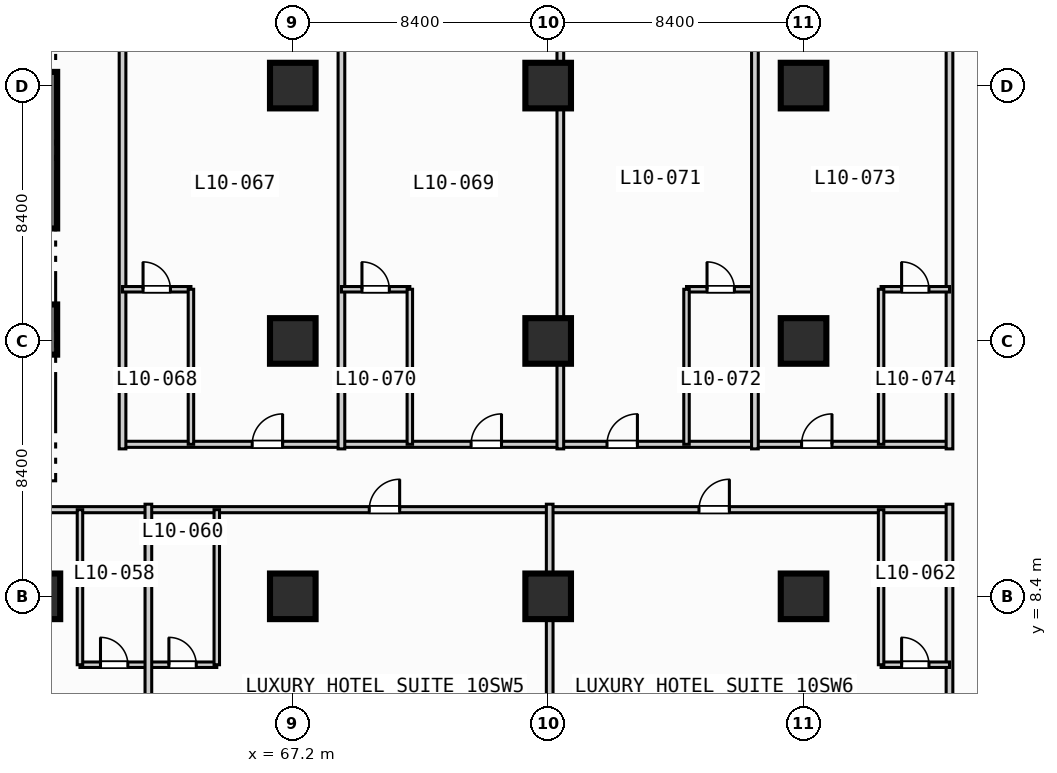
"""IFC4 building model, lengths in metres.
Left out: names, types, materials, properties, quantities, classifications, styles, units other than length and angle.
Written with IfcOpenShell. Run it as: python <this file> out.ifc"""

import sys

from ifc_helpers import new_model, si_unit, direction, frame, frame_2d, origin, origin_2d, place, context, subcontext, project, spatial, rectangle, extrude, element, fill, save


model = new_model("IFC4")
c1 = context("Model", 3, precision=1e-05, world=origin(), true_north=direction((0.0, 1.0)))
c2 = subcontext(c1, "Body", "Model", "MODEL_VIEW")
j1 = project(units=[si_unit("LENGTHUNIT", "METRE"), si_unit("PLANEANGLEUNIT", "RADIAN")], contexts=[c1])
p1 = place(None, origin())
s1 = spatial("IfcSite", under=j1, at=p1, CompositionType="ELEMENT")
p2 = place(p1, origin())
s2 = spatial("IfcBuilding", under=s1, at=p2, CompositionType="ELEMENT")
p3 = place(p2, frame((0.0, 0.0, 47.2)))
s3 = spatial("IfcBuildingStorey", under=s2, at=p3, CompositionType="ELEMENT", Elevation=47.2)
p4 = place(p3, frame((59.0, 16.35, 0.0), z_axis=(0.0, 0.0, 1.0), x_axis=(0.0, 1.0, 0.0)))
e1 = element("IfcWall", 1, at=p4, inside=s3, PredefinedType="SHEAR", context=c2, shape_type="SweptSolid", body=[
    extrude(rectangle(XDim=1.65, YDim=0.9, at=frame_2d((0.825, 0.0))), origin(), (0.0, 0.0, 1.0), 3.55),
])
p5 = place(p3, frame((59.0, 20.5, 0.0), z_axis=(0.0, 0.0, 1.0), x_axis=(0.0, 1.0, 0.0)))
e2 = element("IfcWall", 2, at=p5, inside=s3, PredefinedType="SHEAR", context=c2, shape_type="SweptSolid", body=[
    extrude(rectangle(XDim=5.15, YDim=0.9, at=frame_2d((2.575, 0.0))), origin(), (0.0, 0.0, 1.0), 3.55),
])
for number, where, z_axis, x_axis in (
    (3, (58.8, 8.4, 0.0), (0.0, 0.0, 1.0), (1.0, 0.0, 0.0)),
    (4, (67.2, 8.4, 0.0), (0.0, 0.0, 1.0), (1.0, 0.0, 0.0)),
    (5, (67.2, 16.8, 0.0), (0.0, 0.0, 1.0), (1.0, 0.0, 0.0)),
    (6, (67.2, 25.2, 0.0), (0.0, 0.0, 1.0), (1.0, 0.0, 0.0)),
    (7, (75.6, 8.4, 0.0), (0.0, 0.0, 1.0), (1.0, 0.0, 0.0)),
    (8, (75.6, 16.8, 0.0), (0.0, 0.0, 1.0), (1.0, 0.0, 0.0)),
    (9, (75.6, 25.2, 0.0), (0.0, 0.0, 1.0), (1.0, 0.0, 0.0)),
    (10, (84.0, 8.4, 0.0), (0.0, 0.0, 1.0), (1.0, 0.0, 0.0)),
    (11, (84.0, 16.8, 0.0), (0.0, 0.0, 1.0), (1.0, 0.0, 0.0)),
    (12, (84.0, 25.2, 0.0), (0.0, 0.0, 1.0), (1.0, 0.0, 0.0)),
):
    element("IfcColumn", number, at=place(p3, frame(where, z_axis=z_axis, x_axis=x_axis)), inside=s3, PredefinedType="COLUMN", context=c2, shape_type="SweptSolid", body=[
        extrude(rectangle(XDim=1.5, YDim=1.5, at=origin_2d()), origin(), (0.0, 0.0, 1.0), 3.8),
    ])
p6 = place(p3, frame((13.65, 11.25, 0.0), z_axis=(0.0, 0.0, 1.0), x_axis=(1.0, 0.0, 0.0)))
e13 = element("IfcWall", 13, at=p6, inside=s3, PredefinedType="PARTITIONING", context=c2, shape_type="SweptSolid", body=[
    extrude(rectangle(XDim=75.15, YDim=0.2, at=frame_2d((37.575, 0.0))), origin(), (0.0, 0.0, 1.0), 3.55),
])
p7 = place(p6, frame((7.265, 0.0, 0.0)))
e14 = element("IfcOpeningElement", 14, at=p7, cuts=e13, PredefinedType="OPENING", context=c2, shape_type="SweptSolid", body=[
    extrude(rectangle(XDim=1.0, YDim=2.15, at=frame_2d((0.5, 1.075))), frame((0.0, 0.11, 0.0), z_axis=(0.0, -1.0, 0.0), x_axis=(1.0, 0.0, 0.0)), (0.0, 0.0, 1.0), 0.22),
])
p8 = place(p6, frame((17.135, 0.0, 0.0)))
e15 = element("IfcOpeningElement", 15, at=p8, cuts=e13, PredefinedType="OPENING", context=c2, shape_type="SweptSolid", body=[
    extrude(rectangle(XDim=1.0, YDim=2.15, at=frame_2d((0.5, 1.075))), frame((0.0, 0.11, 0.0), z_axis=(0.0, -1.0, 0.0), x_axis=(1.0, 0.0, 0.0)), (0.0, 0.0, 1.0), 0.22),
])
p9 = place(p6, frame((31.665, 0.0, 0.0)))
e16 = element("IfcOpeningElement", 16, at=p9, cuts=e13, PredefinedType="OPENING", context=c2, shape_type="SweptSolid", body=[
    extrude(rectangle(XDim=1.0, YDim=2.15, at=frame_2d((0.5, 1.075))), frame((0.0, 0.11, 0.0), z_axis=(0.0, -1.0, 0.0), x_axis=(1.0, 0.0, 0.0)), (0.0, 0.0, 1.0), 0.22),
])
p10 = place(p6, frame((41.535, 0.0, 0.0)))
e17 = element("IfcOpeningElement", 17, at=p10, cuts=e13, PredefinedType="OPENING", context=c2, shape_type="SweptSolid", body=[
    extrude(rectangle(XDim=1.0, YDim=2.15, at=frame_2d((0.5, 1.075))), frame((0.0, 0.11, 0.0), z_axis=(0.0, -1.0, 0.0), x_axis=(1.0, 0.0, 0.0)), (0.0, 0.0, 1.0), 0.22),
])
p11 = place(p6, frame((56.065, 0.0, 0.0)))
e18 = element("IfcOpeningElement", 18, at=p11, cuts=e13, PredefinedType="OPENING", context=c2, shape_type="SweptSolid", body=[
    extrude(rectangle(XDim=1.0, YDim=2.15, at=frame_2d((0.5, 1.075))), frame((0.0, 0.11, 0.0), z_axis=(0.0, -1.0, 0.0), x_axis=(1.0, 0.0, 0.0)), (0.0, 0.0, 1.0), 0.22),
])
p12 = place(p6, frame((66.91, 0.0, 0.0)))
e19 = element("IfcOpeningElement", 19, at=p12, cuts=e13, PredefinedType="OPENING", context=c2, shape_type="SweptSolid", body=[
    extrude(rectangle(XDim=1.0, YDim=2.15, at=frame_2d((0.5, 1.075))), frame((0.0, 0.11, 0.0), z_axis=(0.0, -1.0, 0.0), x_axis=(1.0, 0.0, 0.0)), (0.0, 0.0, 1.0), 0.22),
])
p13 = place(p3, frame((60.2, 6.15, 0.0), z_axis=(0.0, 0.0, 1.0), x_axis=(1.0, 0.0, 0.0)))
e20 = element("IfcWall", 20, at=p13, inside=s3, PredefinedType="PLUMBINGWALL", context=c2, shape_type="SweptSolid", body=[
    extrude(rectangle(XDim=4.5, YDim=0.18, at=frame_2d((2.25, 0.0))), origin(), (0.0, 0.0, 1.0), 3.55),
])
p14 = place(p13, frame((0.675, 0.0, 0.0)))
e21 = element("IfcOpeningElement", 21, at=p14, cuts=e20, PredefinedType="OPENING", context=c2, shape_type="SweptSolid", body=[
    extrude(rectangle(XDim=0.9, YDim=2.1, at=frame_2d((0.45, 1.05))), frame((0.0, 0.1, 0.0), z_axis=(0.0, -1.0, 0.0), x_axis=(1.0, 0.0, 0.0)), (0.0, 0.0, 1.0), 0.2),
])
p15 = place(p13, frame((2.925, 0.0, 0.0)))
e22 = element("IfcOpeningElement", 22, at=p15, cuts=e20, PredefinedType="OPENING", context=c2, shape_type="SweptSolid", body=[
    extrude(rectangle(XDim=0.9, YDim=2.1, at=frame_2d((0.45, 1.05))), frame((0.0, 0.1, 0.0), z_axis=(0.0, -1.0, 0.0), x_axis=(1.0, 0.0, 0.0)), (0.0, 0.0, 1.0), 0.2),
])
p16 = place(p3, frame((60.2, 6.15, 0.0), z_axis=(0.0, 0.0, 1.0), x_axis=(0.0, 1.0, 0.0)))
e23 = element("IfcWall", 23, at=p16, inside=s3, PredefinedType="PLUMBINGWALL", context=c2, shape_type="SweptSolid", body=[
    extrude(rectangle(XDim=5.1, YDim=0.18, at=frame_2d((2.55, 0.0))), origin(), (0.0, 0.0, 1.0), 3.55),
])
p17 = place(p3, frame((62.45, 0.2, 0.0), z_axis=(0.0, 0.0, 1.0), x_axis=(0.0, 1.0, 0.0)))
e24 = element("IfcWall", 24, at=p17, inside=s3, PredefinedType="PARTITIONING", context=c2, shape_type="SweptSolid", body=[
    extrude(rectangle(XDim=11.23, YDim=0.22, at=frame_2d((5.615, 0.0))), origin(), (0.0, 0.0, 1.0), 3.55),
])
p18 = place(p3, frame((64.7, 6.15, 0.0), z_axis=(0.0, 0.0, 1.0), x_axis=(0.0, 1.0, 0.0)))
e25 = element("IfcWall", 25, at=p18, inside=s3, PredefinedType="PLUMBINGWALL", context=c2, shape_type="SweptSolid", body=[
    extrude(rectangle(XDim=5.1, YDim=0.18, at=frame_2d((2.55, 0.0))), origin(), (0.0, 0.0, 1.0), 3.55),
])
p19 = place(p3, frame((75.65, 0.2, 0.0), z_axis=(0.0, 0.0, 1.0), x_axis=(0.0, 1.0, 0.0)))
e26 = element("IfcWall", 26, at=p19, inside=s3, PredefinedType="PARTITIONING", context=c2, shape_type="SweptSolid", body=[
    extrude(rectangle(XDim=11.23, YDim=0.22, at=frame_2d((5.615, 0.0))), origin(), (0.0, 0.0, 1.0), 2.8),
])
p20 = place(p3, frame((88.8, 0.2, 0.0), z_axis=(0.0, 0.0, 1.0), x_axis=(0.0, 1.0, 0.0)))
e27 = element("IfcWall", 27, at=p20, inside=s3, PredefinedType="PARTITIONING", context=c2, shape_type="SweptSolid", body=[
    extrude(rectangle(XDim=11.23, YDim=0.22, at=frame_2d((5.615, 0.0))), origin(), (0.0, 0.0, 1.0), 3.55),
])
p21 = place(p3, frame((86.55, 6.15, 0.0), z_axis=(0.0, 0.0, 1.0), x_axis=(1.0, 0.0, 0.0)))
e28 = element("IfcWall", 28, at=p21, inside=s3, PredefinedType="PLUMBINGWALL", context=c2, shape_type="SweptSolid", body=[
    extrude(rectangle(XDim=2.25, YDim=0.18, at=frame_2d((1.125, 0.0))), origin(), (0.0, 0.0, 1.0), 3.55),
])
p22 = place(p21, frame((0.675, 0.0, 0.0)))
e29 = element("IfcOpeningElement", 29, at=p22, cuts=e28, PredefinedType="OPENING", context=c2, shape_type="SweptSolid", body=[
    extrude(rectangle(XDim=0.9, YDim=2.1, at=frame_2d((0.45, 1.05))), frame((0.0, 0.1, 0.0), z_axis=(0.0, -1.0, 0.0), x_axis=(1.0, 0.0, 0.0)), (0.0, 0.0, 1.0), 0.2),
])
p23 = place(p3, frame((86.55, 6.15, 0.0), z_axis=(0.0, 0.0, 1.0), x_axis=(0.0, 1.0, 0.0)))
e30 = element("IfcWall", 30, at=p23, inside=s3, PredefinedType="PLUMBINGWALL", context=c2, shape_type="SweptSolid", body=[
    extrude(rectangle(XDim=5.1, YDim=0.18, at=frame_2d((2.55, 0.0))), origin(), (0.0, 0.0, 1.0), 3.55),
])
p24 = place(p3, frame((61.6, 13.4, 0.0), z_axis=(0.0, 0.0, 1.0), x_axis=(1.0, 0.0, 0.0)))
e31 = element("IfcWall", 31, at=p24, inside=s3, PredefinedType="PARTITIONING", context=c2, shape_type="SweptSolid", body=[
    extrude(rectangle(XDim=27.2, YDim=0.2, at=frame_2d((13.6, 0.0))), origin(), (0.0, 0.0, 1.0), 3.55),
])
p25 = place(p24, frame((4.265, 0.0, 0.0)))
e32 = element("IfcOpeningElement", 32, at=p25, cuts=e31, PredefinedType="OPENING", context=c2, shape_type="SweptSolid", body=[
    extrude(rectangle(XDim=1.0, YDim=2.15, at=frame_2d((0.5, 1.075))), frame((0.0, 0.11, 0.0), z_axis=(0.0, -1.0, 0.0), x_axis=(1.0, 0.0, 0.0)), (0.0, 0.0, 1.0), 0.22),
])
p26 = place(p24, frame((11.465, 0.0, 0.0)))
e33 = element("IfcOpeningElement", 33, at=p26, cuts=e31, PredefinedType="OPENING", context=c2, shape_type="SweptSolid", body=[
    extrude(rectangle(XDim=1.0, YDim=2.15, at=frame_2d((0.5, 1.075))), frame((0.0, 0.11, 0.0), z_axis=(0.0, -1.0, 0.0), x_axis=(1.0, 0.0, 0.0)), (0.0, 0.0, 1.0), 0.22),
])
p27 = place(p24, frame((15.935, 0.0, 0.0)))
e34 = element("IfcOpeningElement", 34, at=p27, cuts=e31, PredefinedType="OPENING", context=c2, shape_type="SweptSolid", body=[
    extrude(rectangle(XDim=1.0, YDim=2.15, at=frame_2d((0.5, 1.075))), frame((0.0, 0.11, 0.0), z_axis=(0.0, -1.0, 0.0), x_axis=(1.0, 0.0, 0.0)), (0.0, 0.0, 1.0), 0.22),
])
p28 = place(p24, frame((22.335, 0.0, 0.0)))
e35 = element("IfcOpeningElement", 35, at=p28, cuts=e31, PredefinedType="OPENING", context=c2, shape_type="SweptSolid", body=[
    extrude(rectangle(XDim=1.0, YDim=2.15, at=frame_2d((0.5, 1.075))), frame((0.0, 0.11, 0.0), z_axis=(0.0, -1.0, 0.0), x_axis=(1.0, 0.0, 0.0)), (0.0, 0.0, 1.0), 0.22),
])
p29 = place(p3, frame((61.6, 13.25, 0.0), z_axis=(0.0, 0.0, 1.0), x_axis=(0.0, 1.0, 0.0)))
e36 = element("IfcWall", 36, at=p29, inside=s3, PredefinedType="PARTITIONING", context=c2, shape_type="SweptSolid", body=[
    extrude(rectangle(XDim=20.18, YDim=0.22, at=frame_2d((10.09, 0.0))), origin(), (0.0, 0.0, 1.0), 3.55),
])
p30 = place(p3, frame((61.6, 18.5, 0.0), z_axis=(0.0, 0.0, 1.0), x_axis=(1.0, 0.0, 0.0)))
e37 = element("IfcWall", 37, at=p30, inside=s3, PredefinedType="PLUMBINGWALL", context=c2, shape_type="SweptSolid", body=[
    extrude(rectangle(XDim=2.25, YDim=0.18, at=frame_2d((1.125, 0.0))), origin(), (0.0, 0.0, 1.0), 3.55),
])
p31 = place(p30, frame((0.675, 0.0, 0.0)))
e38 = element("IfcOpeningElement", 38, at=p31, cuts=e37, PredefinedType="OPENING", context=c2, shape_type="SweptSolid", body=[
    extrude(rectangle(XDim=0.9, YDim=2.1, at=frame_2d((0.45, 1.05))), frame((0.0, 0.1, 0.0), z_axis=(0.0, -1.0, 0.0), x_axis=(1.0, 0.0, 0.0)), (0.0, 0.0, 1.0), 0.2),
])
p32 = place(p3, frame((63.85, 13.4, 0.0), z_axis=(0.0, 0.0, 1.0), x_axis=(0.0, 1.0, 0.0)))
e39 = element("IfcWall", 39, at=p32, inside=s3, PredefinedType="PLUMBINGWALL", context=c2, shape_type="SweptSolid", body=[
    extrude(rectangle(XDim=5.1, YDim=0.18, at=frame_2d((2.55, 0.0))), origin(), (0.0, 0.0, 1.0), 3.55),
])
p33 = place(p3, frame((68.8, 13.25, 0.0), z_axis=(0.0, 0.0, 1.0), x_axis=(0.0, 1.0, 0.0)))
e40 = element("IfcWall", 40, at=p33, inside=s3, PredefinedType="PARTITIONING", context=c2, shape_type="SweptSolid", body=[
    extrude(rectangle(XDim=20.18, YDim=0.22, at=frame_2d((10.09, 0.0))), origin(), (0.0, 0.0, 1.0), 3.55),
])
p34 = place(p3, frame((68.8, 18.5, 0.0), z_axis=(0.0, 0.0, 1.0), x_axis=(1.0, 0.0, 0.0)))
e41 = element("IfcWall", 41, at=p34, inside=s3, PredefinedType="PLUMBINGWALL", context=c2, shape_type="SweptSolid", body=[
    extrude(rectangle(XDim=2.25, YDim=0.18, at=frame_2d((1.125, 0.0))), origin(), (0.0, 0.0, 1.0), 3.55),
])
p35 = place(p34, frame((0.675, 0.0, 0.0)))
e42 = element("IfcOpeningElement", 42, at=p35, cuts=e41, PredefinedType="OPENING", context=c2, shape_type="SweptSolid", body=[
    extrude(rectangle(XDim=0.9, YDim=2.1, at=frame_2d((0.45, 1.05))), frame((0.0, 0.1, 0.0), z_axis=(0.0, -1.0, 0.0), x_axis=(1.0, 0.0, 0.0)), (0.0, 0.0, 1.0), 0.2),
])
p36 = place(p3, frame((71.05, 13.4, 0.0), z_axis=(0.0, 0.0, 1.0), x_axis=(0.0, 1.0, 0.0)))
e43 = element("IfcWall", 43, at=p36, inside=s3, PredefinedType="PLUMBINGWALL", context=c2, shape_type="SweptSolid", body=[
    extrude(rectangle(XDim=5.1, YDim=0.18, at=frame_2d((2.55, 0.0))), origin(), (0.0, 0.0, 1.0), 3.55),
])
p37 = place(p3, frame((76.0, 13.25, 0.0), z_axis=(0.0, 0.0, 1.0), x_axis=(0.0, 1.0, 0.0)))
e44 = element("IfcWall", 44, at=p37, inside=s3, PredefinedType="PARTITIONING", context=c2, shape_type="SweptSolid", body=[
    extrude(rectangle(XDim=20.18, YDim=0.22, at=frame_2d((10.09, 0.0))), origin(), (0.0, 0.0, 1.0), 3.55),
])
p38 = place(p3, frame((80.15, 18.5, 0.0), z_axis=(0.0, 0.0, 1.0), x_axis=(1.0, 0.0, 0.0)))
e45 = element("IfcWall", 45, at=p38, inside=s3, PredefinedType="PLUMBINGWALL", context=c2, shape_type="SweptSolid", body=[
    extrude(rectangle(XDim=2.25, YDim=0.18, at=frame_2d((1.125, 0.0))), origin(), (0.0, 0.0, 1.0), 3.55),
])
p39 = place(p38, frame((0.675, 0.0, 0.0)))
e46 = element("IfcOpeningElement", 46, at=p39, cuts=e45, PredefinedType="OPENING", context=c2, shape_type="SweptSolid", body=[
    extrude(rectangle(XDim=0.9, YDim=2.1, at=frame_2d((0.45, 1.05))), frame((0.0, 0.1, 0.0), z_axis=(0.0, -1.0, 0.0), x_axis=(1.0, 0.0, 0.0)), (0.0, 0.0, 1.0), 0.2),
])
p40 = place(p3, frame((80.15, 13.4, 0.0), z_axis=(0.0, 0.0, 1.0), x_axis=(0.0, 1.0, 0.0)))
e47 = element("IfcWall", 47, at=p40, inside=s3, PredefinedType="PLUMBINGWALL", context=c2, shape_type="SweptSolid", body=[
    extrude(rectangle(XDim=5.1, YDim=0.18, at=frame_2d((2.55, 0.0))), origin(), (0.0, 0.0, 1.0), 3.55),
])
for number, where, z_axis, x_axis in (
    (48, (82.4, 13.25, 0.0), (0.0, 0.0, 1.0), (0.0, 1.0, 0.0)),
    (49, (88.8, 13.25, 0.0), (0.0, 0.0, 1.0), (0.0, 1.0, 0.0)),
):
    element("IfcWall", number, at=place(p3, frame(where, z_axis=z_axis, x_axis=x_axis)), inside=s3, PredefinedType="PARTITIONING", context=c2, shape_type="SweptSolid", body=[
        extrude(rectangle(XDim=20.18, YDim=0.22, at=frame_2d((10.09, 0.0))), origin(), (0.0, 0.0, 1.0), 3.55),
    ])
p41 = place(p3, frame((86.55, 18.5, 0.0), z_axis=(0.0, 0.0, 1.0), x_axis=(1.0, 0.0, 0.0)))
e50 = element("IfcWall", 50, at=p41, inside=s3, PredefinedType="PLUMBINGWALL", context=c2, shape_type="SweptSolid", body=[
    extrude(rectangle(XDim=2.25, YDim=0.18, at=frame_2d((1.125, 0.0))), origin(), (0.0, 0.0, 1.0), 3.55),
])
p42 = place(p41, frame((0.675, 0.0, 0.0)))
e51 = element("IfcOpeningElement", 51, at=p42, cuts=e50, PredefinedType="OPENING", context=c2, shape_type="SweptSolid", body=[
    extrude(rectangle(XDim=0.9, YDim=2.1, at=frame_2d((0.45, 1.05))), frame((0.0, 0.1, 0.0), z_axis=(0.0, -1.0, 0.0), x_axis=(1.0, 0.0, 0.0)), (0.0, 0.0, 1.0), 0.2),
])
p43 = place(p3, frame((86.55, 13.4, 0.0), z_axis=(0.0, 0.0, 1.0), x_axis=(0.0, 1.0, 0.0)))
e52 = element("IfcWall", 52, at=p43, inside=s3, PredefinedType="PLUMBINGWALL", context=c2, shape_type="SweptSolid", body=[
    extrude(rectangle(XDim=5.1, YDim=0.18, at=frame_2d((2.55, 0.0))), origin(), (0.0, 0.0, 1.0), 3.55),
])
p44 = place(p11, origin())
e53 = element("IfcDoor", 53, at=p44, inside=s3, OperationType="SINGLE_SWING_RIGHT", PredefinedType="DOOR", context=c2, shape_type="SweptSolid", body=[
    extrude(rectangle(XDim=1.0, YDim=2.15, at=frame_2d((0.5, 1.075))), frame((0.0, 0.025, 0.0), z_axis=(0.0, -1.0, 0.0), x_axis=(1.0, 0.0, 0.0)), (0.0, 0.0, 1.0), 0.05),
])
fill(e18, e53)
p45 = place(p12, origin())
e54 = element("IfcDoor", 54, at=p45, inside=s3, OperationType="SINGLE_SWING_RIGHT", PredefinedType="DOOR", context=c2, shape_type="SweptSolid", body=[
    extrude(rectangle(XDim=1.0, YDim=2.15, at=frame_2d((0.5, 1.075))), frame((0.0, 0.025, 0.0), z_axis=(0.0, -1.0, 0.0), x_axis=(1.0, 0.0, 0.0)), (0.0, 0.0, 1.0), 0.05),
])
fill(e19, e54)
p46 = place(p14, origin())
e55 = element("IfcDoor", 55, at=p46, inside=s3, OperationType="SINGLE_SWING_LEFT", PredefinedType="DOOR", context=c2, shape_type="SweptSolid", body=[
    extrude(rectangle(XDim=0.9, YDim=2.1, at=frame_2d((0.45, 1.05))), frame((0.0, 0.025, 0.0), z_axis=(0.0, -1.0, 0.0), x_axis=(1.0, 0.0, 0.0)), (0.0, 0.0, 1.0), 0.05),
])
fill(e21, e55)
p47 = place(p15, origin())
e56 = element("IfcDoor", 56, at=p47, inside=s3, OperationType="SINGLE_SWING_LEFT", PredefinedType="DOOR", context=c2, shape_type="SweptSolid", body=[
    extrude(rectangle(XDim=0.9, YDim=2.1, at=frame_2d((0.45, 1.05))), frame((0.0, 0.025, 0.0), z_axis=(0.0, -1.0, 0.0), x_axis=(1.0, 0.0, 0.0)), (0.0, 0.0, 1.0), 0.05),
])
fill(e22, e56)
p48 = place(p22, origin())
e57 = element("IfcDoor", 57, at=p48, inside=s3, OperationType="SINGLE_SWING_LEFT", PredefinedType="DOOR", context=c2, shape_type="SweptSolid", body=[
    extrude(rectangle(XDim=0.9, YDim=2.1, at=frame_2d((0.45, 1.05))), frame((0.0, 0.025, 0.0), z_axis=(0.0, -1.0, 0.0), x_axis=(1.0, 0.0, 0.0)), (0.0, 0.0, 1.0), 0.05),
])
fill(e29, e57)
p49 = place(p25, origin())
e58 = element("IfcDoor", 58, at=p49, inside=s3, OperationType="SINGLE_SWING_RIGHT", PredefinedType="DOOR", context=c2, shape_type="SweptSolid", body=[
    extrude(rectangle(XDim=1.0, YDim=2.15, at=frame_2d((0.5, 1.075))), frame((0.0, 0.025, 0.0), z_axis=(0.0, -1.0, 0.0), x_axis=(1.0, 0.0, 0.0)), (0.0, 0.0, 1.0), 0.05),
])
fill(e32, e58)
p50 = place(p26, origin())
e59 = element("IfcDoor", 59, at=p50, inside=s3, OperationType="SINGLE_SWING_RIGHT", PredefinedType="DOOR", context=c2, shape_type="SweptSolid", body=[
    extrude(rectangle(XDim=1.0, YDim=2.15, at=frame_2d((0.5, 1.075))), frame((0.0, 0.025, 0.0), z_axis=(0.0, -1.0, 0.0), x_axis=(1.0, 0.0, 0.0)), (0.0, 0.0, 1.0), 0.05),
])
fill(e33, e59)
p51 = place(p27, origin())
e60 = element("IfcDoor", 60, at=p51, inside=s3, OperationType="SINGLE_SWING_RIGHT", PredefinedType="DOOR", context=c2, shape_type="SweptSolid", body=[
    extrude(rectangle(XDim=1.0, YDim=2.15, at=frame_2d((0.5, 1.075))), frame((0.0, 0.025, 0.0), z_axis=(0.0, -1.0, 0.0), x_axis=(1.0, 0.0, 0.0)), (0.0, 0.0, 1.0), 0.05),
])
fill(e34, e60)
p52 = place(p28, origin())
e61 = element("IfcDoor", 61, at=p52, inside=s3, OperationType="SINGLE_SWING_RIGHT", PredefinedType="DOOR", context=c2, shape_type="SweptSolid", body=[
    extrude(rectangle(XDim=1.0, YDim=2.15, at=frame_2d((0.5, 1.075))), frame((0.0, 0.025, 0.0), z_axis=(0.0, -1.0, 0.0), x_axis=(1.0, 0.0, 0.0)), (0.0, 0.0, 1.0), 0.05),
])
fill(e35, e61)
p53 = place(p31, origin())
e62 = element("IfcDoor", 62, at=p53, inside=s3, OperationType="SINGLE_SWING_LEFT", PredefinedType="DOOR", context=c2, shape_type="SweptSolid", body=[
    extrude(rectangle(XDim=0.9, YDim=2.1, at=frame_2d((0.45, 1.05))), frame((0.0, 0.025, 0.0), z_axis=(0.0, -1.0, 0.0), x_axis=(1.0, 0.0, 0.0)), (0.0, 0.0, 1.0), 0.05),
])
fill(e38, e62)
p54 = place(p35, origin())
e63 = element("IfcDoor", 63, at=p54, inside=s3, OperationType="SINGLE_SWING_LEFT", PredefinedType="DOOR", context=c2, shape_type="SweptSolid", body=[
    extrude(rectangle(XDim=0.9, YDim=2.1, at=frame_2d((0.45, 1.05))), frame((0.0, 0.025, 0.0), z_axis=(0.0, -1.0, 0.0), x_axis=(1.0, 0.0, 0.0)), (0.0, 0.0, 1.0), 0.05),
])
fill(e42, e63)
p55 = place(p39, origin())
e64 = element("IfcDoor", 64, at=p55, inside=s3, OperationType="SINGLE_SWING_LEFT", PredefinedType="DOOR", context=c2, shape_type="SweptSolid", body=[
    extrude(rectangle(XDim=0.9, YDim=2.1, at=frame_2d((0.45, 1.05))), frame((0.0, 0.025, 0.0), z_axis=(0.0, -1.0, 0.0), x_axis=(1.0, 0.0, 0.0)), (0.0, 0.0, 1.0), 0.05),
])
fill(e46, e64)
p56 = place(p42, origin())
e65 = element("IfcDoor", 65, at=p56, inside=s3, OperationType="SINGLE_SWING_LEFT", PredefinedType="DOOR", context=c2, shape_type="SweptSolid", body=[
    extrude(rectangle(XDim=0.9, YDim=2.1, at=frame_2d((0.45, 1.05))), frame((0.0, 0.025, 0.0), z_axis=(0.0, -1.0, 0.0), x_axis=(1.0, 0.0, 0.0)), (0.0, 0.0, 1.0), 0.05),
])
fill(e51, e65)
save(model, sys.argv[1])
